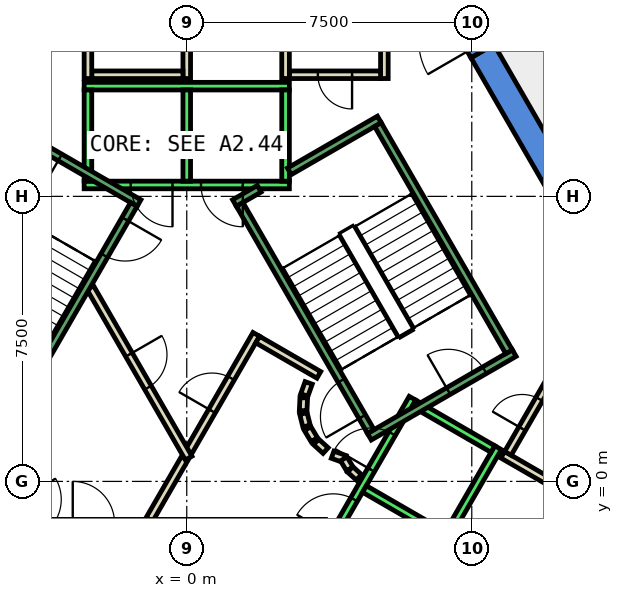
"""IFC4 building model, lengths in metres.
Left out: names, types, materials, properties, quantities, classifications, styles, units other than length and angle.
Written with IfcOpenShell. Run it as: python <this file> out.ifc"""

import sys

from ifc_helpers import new_model, si_unit, direction, frame, frame_2d, origin, place, context, subcontext, project, spatial, polyline, rectangle, outline, extrude, element, fill, save


model = new_model("IFC4")
c1 = context("Model", 3, precision=1e-05, world=origin(), true_north=direction((0.0, 1.0)))
c2 = subcontext(c1, "Body", "Model", "MODEL_VIEW")
j1 = project(units=[si_unit("LENGTHUNIT", "METRE"), si_unit("PLANEANGLEUNIT", "RADIAN")], contexts=[c1])
p1 = place(None, origin())
s1 = spatial("IfcSite", under=j1, at=p1, CompositionType="ELEMENT")
p2 = place(p1, origin())
s2 = spatial("IfcBuilding", under=s1, at=p2, CompositionType="ELEMENT")
p3 = place(p2, frame((0.0, 0.0, 215.0)))
s3 = spatial("IfcBuildingStorey", under=s2, at=p3, CompositionType="ELEMENT", Elevation=215.0)
p4 = place(p3, frame((0.0, 0.0, -0.4)))
e1 = element("IfcWall", 1, at=p4, inside=s3, PredefinedType="SHEAR", context=c2, shape_type="SweptSolid", body=[
    extrude(outline(polyline([(8.084, 11.498), (7.478, 11.148), (12.471, 2.5), (13.279, 2.5), (8.084, 11.498)])), origin(), (0.0, 0.0, 1.0), 4.2),
])
p5 = place(p3, frame((0.0, 0.0, 3.6)))
e2 = element("IfcWall", 2, at=p5, inside=s3, PredefinedType="SHEAR", context=c2, shape_type="SweptSolid", body=[
    extrude(outline(polyline([(7.084, 13.23), (6.478, 12.88), (7.478, 11.148), (8.084, 11.498), (7.084, 13.23)])), origin(), (0.0, 0.0, 1.0), 0.2),
])
p6 = place(p3, frame((0.0, 0.0, -0.4)))
e3 = element("IfcWall", 3, at=p6, inside=s3, PredefinedType="SHEAR", context=c2, shape_type="SweptSolid", body=[
    extrude(outline(polyline([(6.64, -9.0), (13.279, 2.5), (12.471, 2.5), (6.235, -8.3), (6.64, -9.0)])), origin(), (0.0, 0.0, 1.0), 4.2),
])
p7 = place(p3, frame((5.2, 13.3, 0.0), z_axis=(0.0, 0.0, 1.0), x_axis=(0.0, -1.0, 0.0)))
e4 = element("IfcWall", 4, at=p7, inside=s3, PredefinedType="PARTITIONING", context=c2, shape_type="SweptSolid", body=[
    extrude(rectangle(XDim=2.7, YDim=0.2, at=frame_2d((1.35, 0.0))), origin(), (0.0, 0.0, 1.0), 3.8),
])
p8 = place(p3, frame((5.1, 10.7, 0.0), z_axis=(0.0, 0.0, 1.0), x_axis=(-1.0, 0.0, 0.0)))
e5 = element("IfcWall", 5, at=p8, inside=s3, PredefinedType="PARTITIONING", context=c2, shape_type="SweptSolid", body=[
    extrude(rectangle(XDim=2.4, YDim=0.2, at=frame_2d((1.2, 0.0))), origin(), (0.0, 0.0, 1.0), 3.8),
])
p9 = place(p8, frame((0.75, 0.0, 0.0)))
e6 = element("IfcOpeningElement", 6, at=p9, cuts=e5, PredefinedType="OPENING", context=c2, shape_type="SweptSolid", body=[
    extrude(rectangle(XDim=0.9, YDim=2.1, at=frame_2d((0.45, 1.05))), frame((0.0, 0.11, 0.0), z_axis=(0.0, -1.0, 0.0), x_axis=(1.0, 0.0, 0.0)), (0.0, 0.0, 1.0), 0.22),
])
p10 = place(p3, frame((2.6, 10.6, 0.0), z_axis=(0.0, 0.0, 1.0), x_axis=(0.0, 1.0, 0.0)))
e7 = element("IfcWall", 7, at=p10, inside=s3, PredefinedType="PARTITIONING", context=c2, shape_type="SweptSolid", body=[
    extrude(rectangle(XDim=2.7, YDim=0.2, at=frame_2d((1.35, 0.0))), origin(), (0.0, 0.0, 1.0), 3.8),
])
p11 = place(p3, frame((0.0, 13.3, 0.0), z_axis=(0.0, 0.0, 1.0), x_axis=(0.0, -1.0, 0.0)))
e8 = element("IfcWall", 8, at=p11, inside=s3, PredefinedType="PARTITIONING", context=c2, shape_type="SweptSolid", body=[
    extrude(rectangle(XDim=2.7, YDim=0.2, at=frame_2d((1.35, 0.0))), origin(), (0.0, 0.0, 1.0), 3.8),
])
p12 = place(p11, frame((0.85, 0.0, 0.0)))
e9 = element("IfcOpeningElement", 9, at=p12, cuts=e8, PredefinedType="OPENING", context=c2, shape_type="SweptSolid", body=[
    extrude(rectangle(XDim=0.9, YDim=2.1, at=frame_2d((0.45, 1.05))), frame((0.0, 0.11, 0.0), z_axis=(0.0, -1.0, 0.0), x_axis=(1.0, 0.0, 0.0)), (0.0, 0.0, 1.0), 0.22),
])
p13 = place(p3, frame((-0.1, 10.7, 0.0), z_axis=(0.0, 0.0, 1.0), x_axis=(-1.0, 0.0, 0.0)))
e10 = element("IfcWall", 10, at=p13, inside=s3, PredefinedType="PARTITIONING", context=c2, shape_type="SweptSolid", body=[
    extrude(rectangle(XDim=2.4, YDim=0.2, at=frame_2d((1.2, 0.0))), origin(), (0.0, 0.0, 1.0), 3.8),
])
p14 = place(p3, frame((-2.6, 10.6, 0.0), z_axis=(0.0, 0.0, 1.0), x_axis=(0.0, 1.0, 0.0)))
e11 = element("IfcWall", 11, at=p14, inside=s3, PredefinedType="PARTITIONING", context=c2, shape_type="SweptSolid", body=[
    extrude(rectangle(XDim=2.7, YDim=0.2, at=frame_2d((1.35, 0.0))), origin(), (0.0, 0.0, 1.0), 3.8),
])
p15 = place(p3, frame((10.653, -0.648, 0.0), z_axis=(0.0, 0.0, 1.0), x_axis=(-0.866036505625, 0.499980770555, 0.0)))
e12 = element("IfcWall", 12, at=p15, inside=s3, PredefinedType="PARTITIONING", context=c2, shape_type="SweptSolid", body=[
    extrude(rectangle(XDim=2.7, YDim=0.2, at=frame_2d((1.35, 0.0))), origin(), (0.0, 0.0, 1.0), 3.8),
])
p16 = place(p3, frame((8.451, 0.738, 0.0), z_axis=(0.0, 0.0, 1.0), x_axis=(0.499913221443, 0.866075499611, 0.0)))
e13 = element("IfcWall", 13, at=p16, inside=s3, PredefinedType="PARTITIONING", context=c2, shape_type="SweptSolid", body=[
    extrude(rectangle(XDim=2.4, YDim=0.2, at=frame_2d((1.2, 0.0))), origin(), (0.0, 0.0, 1.0), 3.8),
])
p17 = place(p16, frame((0.75, 0.0, 0.0)))
e14 = element("IfcOpeningElement", 14, at=p17, cuts=e13, PredefinedType="OPENING", context=c2, shape_type="SweptSolid", body=[
    extrude(rectangle(XDim=0.9, YDim=2.1, at=frame_2d((0.45, 1.05))), frame((0.0, 0.11, 0.0), z_axis=(0.0, -1.0, 0.0), x_axis=(1.0, 0.0, 0.0)), (0.0, 0.0, 1.0), 0.22),
])
p18 = place(p3, frame((-0.982, -1.0, 0.0), z_axis=(0.0, 0.0, 1.0), x_axis=(0.50024047865, 0.865886518847, 0.0)))
e15 = element("IfcWall", 15, at=p18, inside=s3, PredefinedType="PARTITIONING", context=c2, shape_type="SweptSolid", body=[
    extrude(rectangle(XDim=1.863, YDim=0.2, at=frame_2d((0.931, 0.0))), origin(), (0.0, 0.0, 1.0), 3.8),
])
p19 = place(p3, frame((0.05, 0.787, 0.0), z_axis=(0.0, 0.0, 1.0), x_axis=(0.499954076797, 0.866051915934, 0.0)))
e16 = element("IfcWall", 16, at=p19, inside=s3, PredefinedType="PARTITIONING", context=c2, shape_type="SweptSolid", body=[
    extrude(rectangle(XDim=3.558, YDim=0.2, at=frame_2d((1.779, 0.0))), origin(), (0.0, 0.0, 1.0), 3.8),
])
p20 = place(p19, frame((1.229, 0.0, 0.0)))
e17 = element("IfcOpeningElement", 17, at=p20, cuts=e16, PredefinedType="OPENING", context=c2, shape_type="SweptSolid", body=[
    extrude(rectangle(XDim=1.0, YDim=2.1, at=frame_2d((0.5, 1.05))), frame((0.0, 0.11, 0.0), z_axis=(0.0, -1.0, 0.0), x_axis=(1.0, 0.0, 0.0)), (0.0, 0.0, 1.0), 0.22),
])
p21 = place(p3, frame((1.866, 3.732, 0.0), z_axis=(0.0, 0.0, 1.0), x_axis=(0.866043361281, -0.499968895414, 0.0)))
e18 = element("IfcWall", 18, at=p21, inside=s3, PredefinedType="PARTITIONING", context=c2, shape_type="SweptSolid", body=[
    extrude(rectangle(XDim=1.858, YDim=0.2, at=frame_2d((0.929, 0.0))), origin(), (0.0, 0.0, 1.0), 3.8),
])
p22 = place(p3, frame((3.208, 2.592, 0.0), z_axis=(0.0, 0.0, 1.0), x_axis=(-0.337388820924, -0.941365382578, 0.0)))
e19 = element("IfcWall", 19, at=p22, inside=s3, PredefinedType="PARTITIONING", context=c2, shape_type="SweptSolid", body=[
    extrude(rectangle(XDim=0.338, YDim=0.2, at=frame_2d((0.169, 0.0))), origin(), (0.0, 0.0, 1.0), 3.8),
])
p23 = place(p3, frame((3.079, 2.199, 0.0), z_axis=(0.0, 0.0, 1.0), x_axis=(-0.047771483479, -0.998858290933, 0.0)))
e20 = element("IfcWall", 20, at=p23, inside=s3, PredefinedType="PARTITIONING", context=c2, shape_type="SweptSolid", body=[
    extrude(rectangle(XDim=0.337, YDim=0.2, at=frame_2d((0.169, 0.0))), origin(), (0.0, 0.0, 1.0), 3.8),
])
p24 = place(p3, frame((3.07, 1.786, 0.0), z_axis=(0.0, 0.0, 1.0), x_axis=(0.242705583207, -0.970099994784, 0.0)))
e21 = element("IfcWall", 21, at=p24, inside=s3, PredefinedType="PARTITIONING", context=c2, shape_type="SweptSolid", body=[
    extrude(rectangle(XDim=0.338, YDim=0.2, at=frame_2d((0.169, 0.0))), origin(), (0.0, 0.0, 1.0), 3.8),
])
for number, where, z_axis, x_axis in (
    (22, (3.182, 1.388, 0.0), (0.0, 0.0, 1.0), (0.512, -0.859, 0.0)),
    (23, (3.404, 1.039, 0.0), (0.0, 0.0, 1.0), (0.74, -0.672, 0.0)),
):
    element("IfcWall", number, at=place(p3, frame(where, z_axis=z_axis, x_axis=x_axis)), inside=s3, PredefinedType="PARTITIONING", context=c2, shape_type="SweptSolid", body=[
        extrude(rectangle(XDim=0.338, YDim=0.2, at=frame_2d((0.169, 0.0))), origin(), (0.0, 0.0, 1.0), 3.8),
    ])
p25 = place(p3, frame((3.838, 0.702, 0.0), z_axis=(0.0, 0.0, 1.0), x_axis=(0.941035081519, -0.338308993895, 0.0)))
e24 = element("IfcWall", 24, at=p25, inside=s3, PredefinedType="PARTITIONING", context=c2, shape_type="SweptSolid", body=[
    extrude(rectangle(XDim=0.337, YDim=0.2, at=frame_2d((0.168, 0.0))), origin(), (0.0, 0.0, 1.0), 3.8),
])
p26 = place(p3, frame((4.132, 0.593, 0.0), z_axis=(0.0, 0.0, 1.0), x_axis=(0.513561617048, -0.858052717201, 0.0)))
e25 = element("IfcWall", 25, at=p26, inside=s3, PredefinedType="PARTITIONING", context=c2, shape_type="SweptSolid", body=[
    extrude(rectangle(XDim=0.308, YDim=0.2, at=frame_2d((0.154, 0.0))), origin(), (0.0, 0.0, 1.0), 3.8),
])
p27 = place(p3, frame((4.301, 0.315, 0.0), z_axis=(0.0, 0.0, 1.0), x_axis=(0.741798017506, -0.670623367639, 0.0)))
e26 = element("IfcWall", 26, at=p27, inside=s3, PredefinedType="PARTITIONING", context=c2, shape_type="SweptSolid", body=[
    extrude(rectangle(XDim=0.309, YDim=0.2, at=frame_2d((0.154, 0.0))), origin(), (0.0, 0.0, 1.0), 3.8),
])
p28 = place(p3, frame((-2.54, 5.1, 0.0), z_axis=(0.0, 0.0, 1.0), x_axis=(0.499925051871, -0.866068670783, 0.0)))
e27 = element("IfcWall", 27, at=p28, inside=s3, PredefinedType="PARTITIONING", context=c2, shape_type="SweptSolid", body=[
    extrude(rectangle(XDim=5.181, YDim=0.2, at=frame_2d((2.59, 0.0))), origin(), (0.0, 0.0, 1.0), 3.8),
])
p29 = place(p28, frame((2.04, 0.0, 0.0)))
e28 = element("IfcOpeningElement", 28, at=p29, cuts=e27, PredefinedType="OPENING", context=c2, shape_type="SweptSolid", body=[
    extrude(rectangle(XDim=1.0, YDim=2.1, at=frame_2d((0.5, 1.05))), frame((0.0, 0.11, 0.0), z_axis=(0.0, -1.0, 0.0), x_axis=(1.0, 0.0, 0.0)), (0.0, 0.0, 1.0), 0.22),
])
p30 = place(p3, frame((2.7, 7.8, 0.0), z_axis=(0.0, 0.0, 1.0), x_axis=(-1.0, 0.0, 0.0)))
e29 = element("IfcWall", 29, at=p30, inside=s3, PredefinedType="STANDARD", context=c2, shape_type="SweptSolid", body=[
    extrude(rectangle(XDim=5.4, YDim=0.2, at=frame_2d((2.7, 0.0))), origin(), (0.0, 0.0, 1.0), 3.8),
])
p31 = place(p30, frame((1.225, 0.0, 0.0)))
e30 = element("IfcOpeningElement", 30, at=p31, cuts=e29, PredefinedType="OPENING", context=c2, shape_type="SweptSolid", body=[
    extrude(rectangle(XDim=1.1, YDim=2.1, at=frame_2d((0.55, 1.05))), frame((0.0, 0.11, 0.0), z_axis=(0.0, -1.0, 0.0), x_axis=(1.0, 0.0, 0.0)), (0.0, 0.0, 1.0), 0.22),
])
p32 = place(p30, frame((3.075, 0.0, 0.0)))
e31 = element("IfcOpeningElement", 31, at=p32, cuts=e29, PredefinedType="OPENING", context=c2, shape_type="SweptSolid", body=[
    extrude(rectangle(XDim=1.1, YDim=2.1, at=frame_2d((0.55, 1.05))), frame((0.0, 0.11, 0.0), z_axis=(0.0, -1.0, 0.0), x_axis=(1.0, 0.0, 0.0)), (0.0, 0.0, 1.0), 0.22),
])
p33 = place(p3, frame((2.7, 10.4, 0.0), z_axis=(0.0, 0.0, 1.0), x_axis=(-1.0, 0.0, 0.0)))
e32 = element("IfcWall", 32, at=p33, inside=s3, PredefinedType="STANDARD", context=c2, shape_type="SweptSolid", body=[
    extrude(rectangle(XDim=5.4, YDim=0.2, at=frame_2d((2.7, 0.0))), origin(), (0.0, 0.0, 1.0), 3.8),
])
for number, where, z_axis, x_axis in (
    (33, (2.6, 7.9, 0.0), (0.0, 0.0, 1.0), (0.0, 1.0, 0.0)),
    (34, (0.0, 7.9, 0.0), (0.0, 0.0, 1.0), (0.0, 1.0, 0.0)),
    (35, (-2.6, 7.9, 0.0), (0.0, 0.0, 1.0), (0.0, 1.0, 0.0)),
):
    element("IfcWall", number, at=place(p3, frame(where, z_axis=z_axis, x_axis=x_axis)), inside=s3, PredefinedType="STANDARD", context=c2, shape_type="SweptSolid", body=[
        extrude(rectangle(XDim=2.4, YDim=0.2, at=frame_2d((1.2, 0.0))), origin(), (0.0, 0.0, 1.0), 3.8),
    ])
p34 = place(p3, frame((-5.94, 2.188, 0.0), z_axis=(0.0, 0.0, 1.0), x_axis=(0.500034260056, -0.866005622828, 0.0)))
e36 = element("IfcWall", 36, at=p34, inside=s3, PredefinedType="STANDARD", context=c2, shape_type="SweptSolid", body=[
    extrude(rectangle(XDim=5.399, YDim=0.2, at=frame_2d((2.7, 0.0))), origin(), (0.0, 0.0, 1.0), 3.8),
])
p35 = place(p34, frame((3.075, 0.0, 0.0)))
e37 = element("IfcOpeningElement", 37, at=p35, cuts=e36, PredefinedType="OPENING", context=c2, shape_type="SweptSolid", body=[
    extrude(rectangle(XDim=1.1, YDim=2.1, at=frame_2d((0.55, 1.05))), frame((0.0, 0.11, 0.0), z_axis=(0.0, -1.0, 0.0), x_axis=(1.0, 0.0, 0.0)), (0.0, 0.0, 1.0), 0.22),
])
p36 = place(p34, frame((1.225, 0.0, 0.0)))
e38 = element("IfcOpeningElement", 38, at=p36, cuts=e36, PredefinedType="OPENING", context=c2, shape_type="SweptSolid", body=[
    extrude(rectangle(XDim=1.1, YDim=2.1, at=frame_2d((0.55, 1.05))), frame((0.0, 0.11, 0.0), z_axis=(0.0, -1.0, 0.0), x_axis=(1.0, 0.0, 0.0)), (0.0, 0.0, 1.0), 0.22),
])
p37 = place(p3, frame((3.24, -2.488, 0.0), z_axis=(0.0, 0.0, 1.0), x_axis=(0.500034260056, 0.866005622828, 0.0)))
e39 = element("IfcWall", 39, at=p37, inside=s3, PredefinedType="STANDARD", context=c2, shape_type="SweptSolid", body=[
    extrude(rectangle(XDim=5.399, YDim=0.2, at=frame_2d((2.7, 0.0))), origin(), (0.0, 0.0, 1.0), 3.8),
])
p38 = place(p37, frame((3.225, 0.0, 0.0)))
e40 = element("IfcOpeningElement", 40, at=p38, cuts=e39, PredefinedType="OPENING", context=c2, shape_type="SweptSolid", body=[
    extrude(rectangle(XDim=1.1, YDim=2.1, at=frame_2d((0.55, 1.05))), frame((0.0, 0.11, 0.0), z_axis=(0.0, -1.0, 0.0), x_axis=(1.0, 0.0, 0.0)), (0.0, 0.0, 1.0), 0.22),
])
p39 = place(p37, frame((1.225, 0.0, 0.0)))
e41 = element("IfcOpeningElement", 41, at=p39, cuts=e39, PredefinedType="OPENING", context=c2, shape_type="SweptSolid", body=[
    extrude(rectangle(XDim=1.1, YDim=2.1, at=frame_2d((0.55, 1.05))), frame((0.0, 0.11, 0.0), z_axis=(0.0, -1.0, 0.0), x_axis=(1.0, 0.0, 0.0)), (0.0, 0.0, 1.0), 0.22),
])
p40 = place(p3, frame((5.492, -3.788, 0.0), z_axis=(0.0, 0.0, 1.0), x_axis=(0.500034260056, 0.866005622828, 0.0)))
e42 = element("IfcWall", 42, at=p40, inside=s3, PredefinedType="STANDARD", context=c2, shape_type="SweptSolid", body=[
    extrude(rectangle(XDim=5.399, YDim=0.2, at=frame_2d((2.7, 0.0))), origin(), (0.0, 0.0, 1.0), 3.8),
])
for number, where, z_axis, x_axis in (
    (43, (4.677, -0.2, 0.0), (0.0, 0.0, 1.0), (0.866, -0.5, 0.0)),
    (44, (5.977, 2.052, 0.0), (0.0, 0.0, 1.0), (0.866, -0.5, 0.0)),
):
    element("IfcWall", number, at=place(p3, frame(where, z_axis=z_axis, x_axis=x_axis)), inside=s3, PredefinedType="STANDARD", context=c2, shape_type="SweptSolid", body=[
        extrude(rectangle(XDim=2.399, YDim=0.2, at=frame_2d((1.2, 0.0))), origin(), (0.0, 0.0, 1.0), 3.8),
    ])
p41 = place(p3, frame((4.806, 1.176, 0.0), z_axis=(0.0, 0.0, 1.0), x_axis=(0.866059941101, 0.499940174841, 0.0)))
e45 = element("IfcWall", 45, at=p41, inside=s3, PredefinedType="STANDARD", context=c2, shape_type="SweptSolid", body=[
    extrude(rectangle(XDim=4.4, YDim=0.2, at=frame_2d((2.2, 0.0))), origin(), (0.0, 0.0, 1.0), 3.8),
])
p42 = place(p41, frame((2.4, 0.0, 0.0)))
e46 = element("IfcOpeningElement", 46, at=p42, cuts=e45, PredefinedType="OPENING", context=c2, shape_type="SweptSolid", body=[
    extrude(rectangle(XDim=1.1, YDim=2.2, at=frame_2d((0.55, 1.1))), frame((0.0, 0.11, 0.0), z_axis=(0.0, -1.0, 0.0), x_axis=(1.0, 0.0, 0.0)), (0.0, 0.0, 1.0), 0.22),
])
p43 = place(p3, frame((2.7, 8.158, 0.0), z_axis=(0.0, 0.0, 1.0), x_axis=(0.86611865017, 0.499838457731, 0.0)))
e47 = element("IfcWall", 47, at=p43, inside=s3, PredefinedType="STANDARD", context=c2, shape_type="SweptSolid", body=[
    extrude(rectangle(XDim=2.733, YDim=0.2, at=frame_2d((1.366, 0.0))), origin(), (0.0, 0.0, 1.0), 3.8),
])
p44 = place(p3, frame((1.256, 7.324, 0.0), z_axis=(0.0, 0.0, 1.0), x_axis=(0.865915093549, 0.500191014278, 0.0)))
e48 = element("IfcWall", 48, at=p44, inside=s3, PredefinedType="STANDARD", context=c2, shape_type="SweptSolid", body=[
    extrude(rectangle(XDim=0.752, YDim=0.2, at=frame_2d((0.376, 0.0))), origin(), (0.0, 0.0, 1.0), 3.8),
])
p45 = place(p3, frame((4.843, 1.312, 0.0), z_axis=(0.0, 0.0, 1.0), x_axis=(-0.499963383562, 0.866046543262, 0.0)))
e49 = element("IfcWall", 49, at=p45, inside=s3, PredefinedType="STANDARD", context=c2, shape_type="SweptSolid", body=[
    extrude(rectangle(XDim=6.9, YDim=0.2, at=frame_2d((3.45, 0.0))), origin(), (0.0, 0.0, 1.0), 3.8),
])
p46 = place(p45, frame((0.45, 0.0, 0.0)))
e50 = element("IfcOpeningElement", 50, at=p46, cuts=e49, PredefinedType="OPENING", context=c2, shape_type="SweptSolid", body=[
    extrude(rectangle(XDim=1.1, YDim=2.2, at=frame_2d((0.55, 1.1))), frame((0.0, 0.11, 0.0), z_axis=(0.0, -1.0, 0.0), x_axis=(1.0, 0.0, 0.0)), (0.0, 0.0, 1.0), 0.22),
])
p47 = place(p3, frame((8.48, 3.412, 0.0), z_axis=(0.0, 0.0, 1.0), x_axis=(-0.499978703459, 0.866037698999, 0.0)))
e51 = element("IfcWall", 51, at=p47, inside=s3, PredefinedType="STANDARD", context=c2, shape_type="SweptSolid", body=[
    extrude(rectangle(XDim=6.9, YDim=0.2, at=frame_2d((3.45, 0.0))), origin(), (0.0, 0.0, 1.0), 3.8),
])
p48 = place(p3, frame((-1.256, 7.324, 0.0), z_axis=(0.0, 0.0, 1.0), x_axis=(-0.866046073146, 0.499964197906, 0.0)))
e52 = element("IfcWall", 52, at=p48, inside=s3, PredefinedType="STANDARD", context=c2, shape_type="SweptSolid", body=[
    extrude(rectangle(XDim=4.4, YDim=0.2, at=frame_2d((2.2, 0.0))), origin(), (0.0, 0.0, 1.0), 3.8),
])
p49 = place(p48, frame((2.4, 0.0, 0.0)))
e53 = element("IfcOpeningElement", 53, at=p49, cuts=e52, PredefinedType="OPENING", context=c2, shape_type="SweptSolid", body=[
    extrude(rectangle(XDim=1.1, YDim=2.2, at=frame_2d((0.55, 1.1))), frame((0.0, 0.11, 0.0), z_axis=(0.0, -1.0, 0.0), x_axis=(1.0, 0.0, 0.0)), (0.0, 0.0, 1.0), 0.22),
])
p50 = place(p3, frame((-1.393, 7.288, 0.0), z_axis=(0.0, 0.0, 1.0), x_axis=(-0.499963383562, -0.866046543262, 0.0)))
e54 = element("IfcWall", 54, at=p50, inside=s3, PredefinedType="STANDARD", context=c2, shape_type="SweptSolid", body=[
    extrude(rectangle(XDim=6.9, YDim=0.2, at=frame_2d((3.45, 0.0))), origin(), (0.0, 0.0, 1.0), 3.8),
])
p51 = place(p50, frame((0.45, 0.0, 0.0)))
e55 = element("IfcOpeningElement", 55, at=p51, cuts=e54, PredefinedType="OPENING", context=c2, shape_type="SweptSolid", body=[
    extrude(rectangle(XDim=1.1, YDim=2.2, at=frame_2d((0.55, 1.1))), frame((0.0, 0.11, 0.0), z_axis=(0.0, -1.0, 0.0), x_axis=(1.0, 0.0, 0.0)), (0.0, 0.0, 1.0), 0.22),
])
p52 = place(p20, origin())
e56 = element("IfcDoor", 56, at=p52, inside=s3, OperationType="SINGLE_SWING_RIGHT", PredefinedType="DOOR", context=c2, shape_type="SweptSolid", body=[
    extrude(rectangle(XDim=1.0, YDim=2.1, at=frame_2d((0.5, 1.05))), frame((0.0, 0.025, 0.0), z_axis=(0.0, -1.0, 0.0), x_axis=(1.0, 0.0, 0.0)), (0.0, 0.0, 1.0), 0.05),
])
fill(e17, e56)
p53 = place(p29, origin())
e57 = element("IfcDoor", 57, at=p53, inside=s3, OperationType="SINGLE_SWING_RIGHT", PredefinedType="DOOR", context=c2, shape_type="SweptSolid", body=[
    extrude(rectangle(XDim=1.0, YDim=2.1, at=frame_2d((0.5, 1.05))), frame((0.0, 0.025, 0.0), z_axis=(0.0, -1.0, 0.0), x_axis=(1.0, 0.0, 0.0)), (0.0, 0.0, 1.0), 0.05),
])
fill(e28, e57)
p54 = place(p9, origin())
e58 = element("IfcDoor", 58, at=p54, inside=s3, OperationType="SINGLE_SWING_RIGHT", PredefinedType="DOOR", context=c2, shape_type="SweptSolid", body=[
    extrude(rectangle(XDim=0.9, YDim=2.1, at=frame_2d((0.45, 1.05))), frame((0.0, 0.025, 0.0), z_axis=(0.0, -1.0, 0.0), x_axis=(1.0, 0.0, 0.0)), (0.0, 0.0, 1.0), 0.05),
])
fill(e6, e58)
p55 = place(p17, origin())
e59 = element("IfcDoor", 59, at=p55, inside=s3, OperationType="SINGLE_SWING_LEFT", PredefinedType="DOOR", context=c2, shape_type="SweptSolid", body=[
    extrude(rectangle(XDim=0.9, YDim=2.1, at=frame_2d((0.45, 1.05))), frame((0.0, 0.025, 0.0), z_axis=(0.0, -1.0, 0.0), x_axis=(1.0, 0.0, 0.0)), (0.0, 0.0, 1.0), 0.05),
])
fill(e14, e59)
p56 = place(p31, origin())
e60 = element("IfcDoor", 60, at=p56, inside=s3, OperationType="SLIDING_TO_LEFT", PredefinedType="DOOR", context=c2, shape_type="SweptSolid", body=[
    extrude(rectangle(XDim=1.1, YDim=2.1, at=frame_2d((0.55, 1.05))), frame((0.0, 0.025, 0.0), z_axis=(0.0, -1.0, 0.0), x_axis=(1.0, 0.0, 0.0)), (0.0, 0.0, 1.0), 0.05),
])
fill(e30, e60)
p57 = place(p32, origin())
e61 = element("IfcDoor", 61, at=p57, inside=s3, OperationType="SLIDING_TO_LEFT", PredefinedType="DOOR", context=c2, shape_type="SweptSolid", body=[
    extrude(rectangle(XDim=1.1, YDim=2.1, at=frame_2d((0.55, 1.05))), frame((0.0, 0.025, 0.0), z_axis=(0.0, -1.0, 0.0), x_axis=(1.0, 0.0, 0.0)), (0.0, 0.0, 1.0), 0.05),
])
fill(e31, e61)
p58 = place(p38, origin())
e62 = element("IfcDoor", 62, at=p58, inside=s3, OperationType="SLIDING_TO_LEFT", PredefinedType="DOOR", context=c2, shape_type="SweptSolid", body=[
    extrude(rectangle(XDim=1.1, YDim=2.1, at=frame_2d((0.55, 1.05))), frame((0.0, 0.025, 0.0), z_axis=(0.0, -1.0, 0.0), x_axis=(1.0, 0.0, 0.0)), (0.0, 0.0, 1.0), 0.05),
])
fill(e40, e62)
p59 = place(p39, origin())
e63 = element("IfcDoor", 63, at=p59, inside=s3, OperationType="SLIDING_TO_LEFT", PredefinedType="DOOR", context=c2, shape_type="SweptSolid", body=[
    extrude(rectangle(XDim=1.1, YDim=2.1, at=frame_2d((0.55, 1.05))), frame((0.0, 0.025, 0.0), z_axis=(0.0, -1.0, 0.0), x_axis=(1.0, 0.0, 0.0)), (0.0, 0.0, 1.0), 0.05),
])
fill(e41, e63)
p60 = place(p46, origin())
e64 = element("IfcDoor", 64, at=p60, inside=s3, OperationType="SINGLE_SWING_LEFT", PredefinedType="DOOR", context=c2, shape_type="SweptSolid", body=[
    extrude(rectangle(XDim=1.1, YDim=2.2, at=frame_2d((0.55, 1.1))), frame((0.0, 0.025, 0.0), z_axis=(0.0, -1.0, 0.0), x_axis=(1.0, 0.0, 0.0)), (0.0, 0.0, 1.0), 0.05),
])
fill(e50, e64)
p61 = place(p42, origin())
e65 = element("IfcDoor", 65, at=p61, inside=s3, OperationType="SINGLE_SWING_LEFT", PredefinedType="DOOR", context=c2, shape_type="SweptSolid", body=[
    extrude(rectangle(XDim=1.1, YDim=2.2, at=frame_2d((0.55, 1.1))), frame((0.0, 0.025, 0.0), z_axis=(0.0, -1.0, 0.0), x_axis=(1.0, 0.0, 0.0)), (0.0, 0.0, 1.0), 0.05),
])
fill(e46, e65)
p62 = place(p51, origin())
e66 = element("IfcDoor", 66, at=p62, inside=s3, OperationType="SINGLE_SWING_LEFT", PredefinedType="DOOR", context=c2, shape_type="SweptSolid", body=[
    extrude(rectangle(XDim=1.1, YDim=2.2, at=frame_2d((0.55, 1.1))), frame((0.0, 0.025, 0.0), z_axis=(0.0, -1.0, 0.0), x_axis=(1.0, 0.0, 0.0)), (0.0, 0.0, 1.0), 0.05),
])
fill(e55, e66)
p63 = place(p49, origin())
e67 = element("IfcDoor", 67, at=p63, inside=s3, OperationType="SINGLE_SWING_LEFT", PredefinedType="DOOR", context=c2, shape_type="SweptSolid", body=[
    extrude(rectangle(XDim=1.1, YDim=2.2, at=frame_2d((0.55, 1.1))), frame((0.0, 0.025, 0.0), z_axis=(0.0, -1.0, 0.0), x_axis=(1.0, 0.0, 0.0)), (0.0, 0.0, 1.0), 0.05),
])
fill(e53, e67)
save(model, sys.argv[1])
